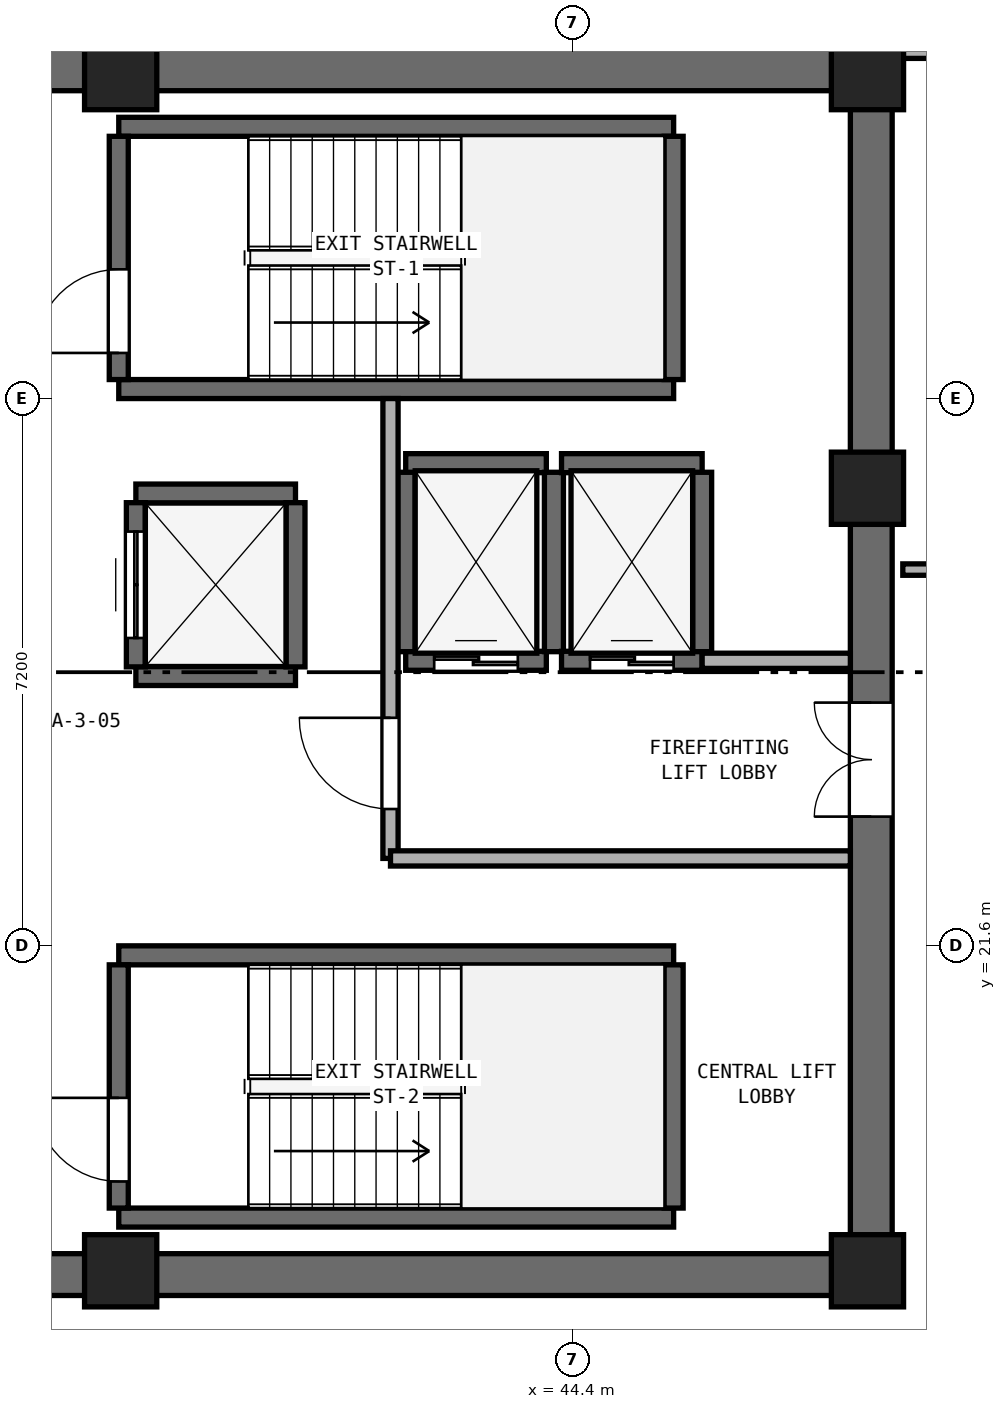
"""IFC4 building model, lengths in metres.
Left out: names, types, materials, properties, quantities, classifications, styles, units other than length and angle.
Written with IfcOpenShell. Run it as: python <this file> out.ifc"""

import sys

from ifc_helpers import new_model, si_unit, direction, frame, frame_2d, origin, origin_2d, place, context, subcontext, project, spatial, rectangle, extrude, element, fill, save


model = new_model("IFC4")
c1 = context("Model", 3, precision=1e-05, world=origin(), true_north=direction((0.0, 1.0)))
c2 = subcontext(c1, "Body", "Model", "MODEL_VIEW")
j1 = project(units=[si_unit("LENGTHUNIT", "METRE"), si_unit("PLANEANGLEUNIT", "RADIAN")], contexts=[c1])
p1 = place(None, origin())
s1 = spatial("IfcSite", under=j1, at=p1, CompositionType="ELEMENT")
p2 = place(p1, origin())
s2 = spatial("IfcBuilding", under=s1, at=p2, CompositionType="ELEMENT")
p3 = place(p2, frame((0.0, 0.0, 212.4)))
s3 = spatial("IfcBuildingStorey", under=s2, at=p3, CompositionType="ELEMENT", Elevation=212.4)
for number, where, z_axis, x_axis in (
    (1, (25.4, 17.275, 0.0), (0.0, 0.0, 1.0), (1.0, 0.0, 0.0)),
    (2, (25.4, 33.125, 0.0), (0.0, 0.0, 1.0), (1.0, 0.0, 0.0)),
):
    element("IfcWall", number, at=place(p3, frame(where, z_axis=z_axis, x_axis=x_axis)), inside=s3, PredefinedType="SHEAR", context=c2, shape_type="SweptSolid", body=[
        extrude(rectangle(XDim=23.2, YDim=0.55, at=frame_2d((11.6, 0.0))), origin(), (0.0, 0.0, 1.0), 3.54),
    ])
p4 = place(p3, frame((48.325, 17.55, 0.0), z_axis=(0.0, 0.0, 1.0), x_axis=(0.0, 1.0, 0.0)))
e3 = element("IfcWall", 3, at=p4, inside=s3, PredefinedType="SHEAR", context=c2, shape_type="SweptSolid", body=[
    extrude(rectangle(XDim=15.3, YDim=0.55, at=frame_2d((7.65, 0.0))), origin(), (0.0, 0.0, 1.0), 3.54),
])
p5 = place(p4, frame((5.75, 0.0, 0.0)))
e4 = element("IfcOpeningElement", 4, at=p5, cuts=e3, PredefinedType="OPENING", context=c2, shape_type="SweptSolid", body=[
    extrude(rectangle(XDim=1.5, YDim=2.15, at=frame_2d((0.75, 1.075))), frame((0.0, 0.285, 0.0), z_axis=(0.0, -1.0, 0.0), x_axis=(1.0, 0.0, 0.0)), (0.0, 0.0, 1.0), 0.57),
])
for number, where, z_axis, x_axis in (
    (5, (38.45, 17.325, 0.0), (0.0, 0.0, 1.0), (1.0, 0.0, 0.0)),
    (6, (48.275, 17.325, 0.0), (0.0, 0.0, 1.0), (1.0, 0.0, 0.0)),
    (7, (48.275, 27.62, 0.0), (0.0, 0.0, 1.0), (1.0, 0.0, 0.0)),
    (8, (48.275, 33.075, 0.0), (0.0, 0.0, 1.0), (1.0, 0.0, 0.0)),
    (9, (38.45, 33.075, 0.0), (0.0, 0.0, 1.0), (1.0, 0.0, 0.0)),
):
    element("IfcColumn", number, at=place(p3, frame(where, z_axis=z_axis, x_axis=x_axis)), inside=s3, PredefinedType="PILASTER", context=c2, shape_type="SweptSolid", body=[
        extrude(rectangle(XDim=0.95, YDim=0.95, at=origin_2d()), origin(), (0.0, 0.0, 1.0), 3.8),
    ])
for number, where, z_axis, x_axis in (
    (10, (38.425, 28.925, 0.0), (0.0, 0.0, 1.0), (1.0, 0.0, 0.0)),
    (11, (38.425, 32.375, 0.0), (0.0, 0.0, 1.0), (1.0, 0.0, 0.0)),
):
    element("IfcWall", number, at=place(p3, frame(where, z_axis=z_axis, x_axis=x_axis)), inside=s3, PredefinedType="SHEAR", context=c2, shape_type="SweptSolid", body=[
        extrude(rectangle(XDim=7.3, YDim=0.25, at=frame_2d((3.65, 0.0))), origin(), (0.0, 0.0, 1.0), 3.54),
    ])
p6 = place(p3, frame((38.425, 29.05, 0.0), z_axis=(0.0, 0.0, 1.0), x_axis=(0.0, 1.0, 0.0)))
e12 = element("IfcWall", 12, at=p6, inside=s3, PredefinedType="SHEAR", context=c2, shape_type="SweptSolid", body=[
    extrude(rectangle(XDim=3.2, YDim=0.25, at=frame_2d((1.6, 0.0))), origin(), (0.0, 0.0, 1.0), 3.54),
])
p7 = place(p6, frame((0.35, 0.0, 0.0)))
e13 = element("IfcOpeningElement", 13, at=p7, cuts=e12, PredefinedType="OPENING", context=c2, shape_type="SweptSolid", body=[
    extrude(rectangle(XDim=1.1, YDim=2.15, at=frame_2d((0.55, 1.075))), frame((0.0, 0.135, 0.0), z_axis=(0.0, -1.0, 0.0), x_axis=(1.0, 0.0, 0.0)), (0.0, 0.0, 1.0), 0.27),
])
p8 = place(p3, frame((45.725, 29.05, 0.0), z_axis=(0.0, 0.0, 1.0), x_axis=(0.0, 1.0, 0.0)))
e14 = element("IfcWall", 14, at=p8, inside=s3, PredefinedType="SHEAR", context=c2, shape_type="SweptSolid", body=[
    extrude(rectangle(XDim=3.2, YDim=0.25, at=frame_2d((1.6, 0.0))), origin(), (0.0, 0.0, 1.0), 3.54),
])
for number, where, z_axis, x_axis in (
    (15, (38.425, 18.025, 0.0), (0.0, 0.0, 1.0), (1.0, 0.0, 0.0)),
    (16, (38.425, 21.475, 0.0), (0.0, 0.0, 1.0), (1.0, 0.0, 0.0)),
):
    element("IfcWall", number, at=place(p3, frame(where, z_axis=z_axis, x_axis=x_axis)), inside=s3, PredefinedType="SHEAR", context=c2, shape_type="SweptSolid", body=[
        extrude(rectangle(XDim=7.3, YDim=0.25, at=frame_2d((3.65, 0.0))), origin(), (0.0, 0.0, 1.0), 3.54),
    ])
p9 = place(p3, frame((38.425, 18.15, 0.0), z_axis=(0.0, 0.0, 1.0), x_axis=(0.0, 1.0, 0.0)))
e17 = element("IfcWall", 17, at=p9, inside=s3, PredefinedType="SHEAR", context=c2, shape_type="SweptSolid", body=[
    extrude(rectangle(XDim=3.2, YDim=0.25, at=frame_2d((1.6, 0.0))), origin(), (0.0, 0.0, 1.0), 3.54),
])
p10 = place(p9, frame((0.35, 0.0, 0.0)))
e18 = element("IfcOpeningElement", 18, at=p10, cuts=e17, PredefinedType="OPENING", context=c2, shape_type="SweptSolid", body=[
    extrude(rectangle(XDim=1.1, YDim=2.15, at=frame_2d((0.55, 1.075))), frame((0.0, 0.135, 0.0), z_axis=(0.0, -1.0, 0.0), x_axis=(1.0, 0.0, 0.0)), (0.0, 0.0, 1.0), 0.27),
])
p11 = place(p3, frame((45.725, 18.15, 0.0), z_axis=(0.0, 0.0, 1.0), x_axis=(0.0, 1.0, 0.0)))
e19 = element("IfcWall", 19, at=p11, inside=s3, PredefinedType="SHEAR", context=c2, shape_type="SweptSolid", body=[
    extrude(rectangle(XDim=3.2, YDim=0.25, at=frame_2d((1.6, 0.0))), origin(), (0.0, 0.0, 1.0), 3.54),
])
p12 = place(p3, frame((42.2, 25.35, 0.0), z_axis=(0.0, 0.0, 1.0), x_axis=(1.0, 0.0, 0.0)))
e20 = element("IfcWall", 20, at=p12, inside=s3, PredefinedType="SHEAR", context=c2, shape_type="SweptSolid", body=[
    extrude(rectangle(XDim=1.85, YDim=0.25, at=frame_2d((0.925, 0.0))), origin(), (0.0, 0.0, 1.0), 3.54),
])
p13 = place(p12, frame((0.375, 0.0, 0.0)))
e21 = element("IfcOpeningElement", 21, at=p13, cuts=e20, PredefinedType="OPENING", context=c2, shape_type="SweptSolid", body=[
    extrude(rectangle(XDim=1.1, YDim=2.15, at=frame_2d((0.55, 1.075))), frame((0.0, 0.135, 0.0), z_axis=(0.0, -1.0, 0.0), x_axis=(1.0, 0.0, 0.0)), (0.0, 0.0, 1.0), 0.27),
])
p14 = place(p3, frame((42.2, 27.95, 0.0), z_axis=(0.0, 0.0, 1.0), x_axis=(1.0, 0.0, 0.0)))
e22 = element("IfcWall", 22, at=p14, inside=s3, PredefinedType="SHEAR", context=c2, shape_type="SweptSolid", body=[
    extrude(rectangle(XDim=1.85, YDim=0.25, at=frame_2d((0.925, 0.0))), origin(), (0.0, 0.0, 1.0), 3.54),
])
for number, where, z_axis, x_axis in (
    (23, (42.2, 25.47, 0.0), (0.0, 0.0, 1.0), (0.0, 1.0, 0.0)),
    (24, (44.15, 25.47, 0.0), (0.0, 0.0, 1.0), (0.0, 1.0, 0.0)),
):
    element("IfcWall", number, at=place(p3, frame(where, z_axis=z_axis, x_axis=x_axis)), inside=s3, PredefinedType="SHEAR", context=c2, shape_type="SweptSolid", body=[
        extrude(rectangle(XDim=2.36, YDim=0.25, at=frame_2d((1.18, 0.0))), origin(), (0.0, 0.0, 1.0), 3.54),
    ])
p15 = place(p3, frame((44.25, 25.35, 0.0), z_axis=(0.0, 0.0, 1.0), x_axis=(1.0, 0.0, 0.0)))
e25 = element("IfcWall", 25, at=p15, inside=s3, PredefinedType="SHEAR", context=c2, shape_type="SweptSolid", body=[
    extrude(rectangle(XDim=1.85, YDim=0.25, at=frame_2d((0.925, 0.0))), origin(), (0.0, 0.0, 1.0), 3.54),
])
p16 = place(p15, frame((0.375, 0.0, 0.0)))
e26 = element("IfcOpeningElement", 26, at=p16, cuts=e25, PredefinedType="OPENING", context=c2, shape_type="SweptSolid", body=[
    extrude(rectangle(XDim=1.1, YDim=2.15, at=frame_2d((0.55, 1.075))), frame((0.0, 0.135, 0.0), z_axis=(0.0, -1.0, 0.0), x_axis=(1.0, 0.0, 0.0)), (0.0, 0.0, 1.0), 0.27),
])
p17 = place(p3, frame((44.25, 27.95, 0.0), z_axis=(0.0, 0.0, 1.0), x_axis=(1.0, 0.0, 0.0)))
e27 = element("IfcWall", 27, at=p17, inside=s3, PredefinedType="SHEAR", context=c2, shape_type="SweptSolid", body=[
    extrude(rectangle(XDim=1.85, YDim=0.25, at=frame_2d((0.925, 0.0))), origin(), (0.0, 0.0, 1.0), 3.54),
])
p18 = place(p3, frame((46.1, 25.47, 0.0), z_axis=(0.0, 0.0, 1.0), x_axis=(0.0, 1.0, 0.0)))
e28 = element("IfcWall", 28, at=p18, inside=s3, PredefinedType="SHEAR", context=c2, shape_type="SweptSolid", body=[
    extrude(rectangle(XDim=2.36, YDim=0.25, at=frame_2d((1.18, 0.0))), origin(), (0.0, 0.0, 1.0), 3.54),
])
for number, where, z_axis, x_axis in (
    (29, (38.65, 25.15, 0.0), (0.0, 0.0, 1.0), (1.0, 0.0, 0.0)),
    (30, (38.65, 27.55, 0.0), (0.0, 0.0, 1.0), (1.0, 0.0, 0.0)),
):
    element("IfcWall", number, at=place(p3, frame(where, z_axis=z_axis, x_axis=x_axis)), inside=s3, PredefinedType="SHEAR", context=c2, shape_type="SweptSolid", body=[
        extrude(rectangle(XDim=2.1, YDim=0.25, at=frame_2d((1.05, 0.0))), origin(), (0.0, 0.0, 1.0), 3.54),
    ])
p19 = place(p3, frame((38.65, 25.27, 0.0), z_axis=(0.0, 0.0, 1.0), x_axis=(0.0, 1.0, 0.0)))
e31 = element("IfcWall", 31, at=p19, inside=s3, PredefinedType="SHEAR", context=c2, shape_type="SweptSolid", body=[
    extrude(rectangle(XDim=2.16, YDim=0.25, at=frame_2d((1.08, 0.0))), origin(), (0.0, 0.0, 1.0), 3.54),
])
p20 = place(p19, frame((0.38, 0.0, 0.0)))
e32 = element("IfcOpeningElement", 32, at=p20, cuts=e31, PredefinedType="OPENING", context=c2, shape_type="SweptSolid", body=[
    extrude(rectangle(XDim=1.4, YDim=2.2, at=frame_2d((0.7, 1.1))), frame((0.0, 0.135, 0.0), z_axis=(0.0, -1.0, 0.0), x_axis=(1.0, 0.0, 0.0)), (0.0, 0.0, 1.0), 0.27),
])
p21 = place(p3, frame((40.75, 25.27, 0.0), z_axis=(0.0, 0.0, 1.0), x_axis=(0.0, 1.0, 0.0)))
e33 = element("IfcWall", 33, at=p21, inside=s3, PredefinedType="SHEAR", context=c2, shape_type="SweptSolid", body=[
    extrude(rectangle(XDim=2.16, YDim=0.25, at=frame_2d((1.08, 0.0))), origin(), (0.0, 0.0, 1.0), 3.54),
])
p22 = place(p3, frame((42.0, 22.75, 0.0), z_axis=(0.0, 0.0, 1.0), x_axis=(0.0, 1.0, 0.0)))
e34 = element("IfcWall", 34, at=p22, inside=s3, PredefinedType="SOLIDWALL", context=c2, shape_type="SweptSolid", body=[
    extrude(rectangle(XDim=6.05, YDim=0.2, at=frame_2d((3.025, 0.0))), origin(), (0.0, 0.0, 1.0), 3.54),
])
p23 = place(p22, frame((0.65, 0.0, 0.0)))
e35 = element("IfcOpeningElement", 35, at=p23, cuts=e34, PredefinedType="OPENING", context=c2, shape_type="SweptSolid", body=[
    extrude(rectangle(XDim=1.2, YDim=2.15, at=frame_2d((0.6, 1.075))), frame((0.0, 0.11, 0.0), z_axis=(0.0, -1.0, 0.0), x_axis=(1.0, 0.0, 0.0)), (0.0, 0.0, 1.0), 0.22),
])
p24 = place(p3, frame((42.0, 22.75, 0.0), z_axis=(0.0, 0.0, 1.0), x_axis=(1.0, 0.0, 0.0)))
e36 = element("IfcWall", 36, at=p24, inside=s3, PredefinedType="SOLIDWALL", context=c2, shape_type="SweptSolid", body=[
    extrude(rectangle(XDim=6.05, YDim=0.2, at=frame_2d((3.025, 0.0))), origin(), (0.0, 0.0, 1.0), 3.54),
])
p25 = place(p3, frame((46.1, 25.35, 0.0), z_axis=(0.0, 0.0, 1.0), x_axis=(1.0, 0.0, 0.0)))
e37 = element("IfcWall", 37, at=p25, inside=s3, PredefinedType="SOLIDWALL", context=c2, shape_type="SweptSolid", body=[
    extrude(rectangle(XDim=1.95, YDim=0.2, at=frame_2d((0.975, 0.0))), origin(), (0.0, 0.0, 1.0), 3.54),
])
p26 = place(p3, frame((48.74, 26.55, 0.0), z_axis=(0.0, 0.0, 1.0), x_axis=(1.0, 0.0, 0.0)))
e38 = element("IfcWall", 38, at=p26, inside=s3, PredefinedType="PARTITIONING", context=c2, shape_type="SweptSolid", body=[
    extrude(rectangle(XDim=14.855, YDim=0.15, at=frame_2d((7.427, 0.0))), origin(), (0.0, 0.0, 1.0), 3.54),
])
p27 = place(p26, frame((6.927, 0.0, 0.0)))
e39 = element("IfcOpeningElement", 39, at=p27, cuts=e38, PredefinedType="OPENING", context=c2, shape_type="SweptSolid", body=[
    extrude(rectangle(XDim=1.0, YDim=2.12, at=frame_2d((0.5, 1.06))), frame((0.0, 0.085, 0.0), z_axis=(0.0, -1.0, 0.0), x_axis=(1.0, 0.0, 0.0)), (0.0, 0.0, 1.0), 0.17),
])
p28 = place(p3, frame((48.74, 33.35, 0.0), z_axis=(0.0, 0.0, 1.0), x_axis=(1.0, 0.0, 0.0)))
e40 = element("IfcWall", 40, at=p28, inside=s3, PredefinedType="PARTITIONING", context=c2, shape_type="SweptSolid", body=[
    extrude(rectangle(XDim=2.759, YDim=0.15, at=frame_2d((1.379, 0.0))), origin(), (0.0, 0.0, 1.0), 2.923),
])
p29 = place(p7, origin())
e41 = element("IfcDoor", 41, at=p29, inside=s3, OperationType="SINGLE_SWING_LEFT", PredefinedType="DOOR", context=c2, shape_type="SweptSolid", body=[
    extrude(rectangle(XDim=1.1, YDim=2.15, at=frame_2d((0.55, 1.075))), frame((0.0, 0.025, 0.0), z_axis=(0.0, -1.0, 0.0), x_axis=(1.0, 0.0, 0.0)), (0.0, 0.0, 1.0), 0.05),
])
fill(e13, e41)
p30 = place(p10, origin())
e42 = element("IfcDoor", 42, at=p30, inside=s3, OperationType="SINGLE_SWING_RIGHT", PredefinedType="DOOR", context=c2, shape_type="SweptSolid", body=[
    extrude(rectangle(XDim=1.1, YDim=2.15, at=frame_2d((0.55, 1.075))), frame((0.0, 0.025, 0.0), z_axis=(0.0, -1.0, 0.0), x_axis=(1.0, 0.0, 0.0)), (0.0, 0.0, 1.0), 0.05),
])
fill(e18, e42)
p31 = place(p13, origin())
e43 = element("IfcDoor", 43, at=p31, inside=s3, OperationType="DOUBLE_DOOR_SLIDING", PredefinedType="DOOR", context=c2, shape_type="SweptSolid", body=[
    extrude(rectangle(XDim=1.1, YDim=2.15, at=frame_2d((0.55, 1.075))), frame((0.0, 0.025, 0.0), z_axis=(0.0, -1.0, 0.0), x_axis=(1.0, 0.0, 0.0)), (0.0, 0.0, 1.0), 0.05),
])
fill(e21, e43)
p32 = place(p16, origin())
e44 = element("IfcDoor", 44, at=p32, inside=s3, OperationType="DOUBLE_DOOR_SLIDING", PredefinedType="DOOR", context=c2, shape_type="SweptSolid", body=[
    extrude(rectangle(XDim=1.1, YDim=2.15, at=frame_2d((0.55, 1.075))), frame((0.0, 0.025, 0.0), z_axis=(0.0, -1.0, 0.0), x_axis=(1.0, 0.0, 0.0)), (0.0, 0.0, 1.0), 0.05),
])
fill(e26, e44)
p33 = place(p20, origin())
e45 = element("IfcDoor", 45, at=p33, inside=s3, OperationType="DOUBLE_DOOR_SLIDING", PredefinedType="DOOR", context=c2, shape_type="SweptSolid", body=[
    extrude(rectangle(XDim=1.4, YDim=2.2, at=frame_2d((0.7, 1.1))), frame((0.0, 0.025, 0.0), z_axis=(0.0, -1.0, 0.0), x_axis=(1.0, 0.0, 0.0)), (0.0, 0.0, 1.0), 0.05),
])
fill(e32, e45)
p34 = place(p23, origin())
e46 = element("IfcDoor", 46, at=p34, inside=s3, OperationType="SINGLE_SWING_RIGHT", PredefinedType="DOOR", context=c2, shape_type="SweptSolid", body=[
    extrude(rectangle(XDim=1.2, YDim=2.15, at=frame_2d((0.6, 1.075))), frame((0.0, 0.025, 0.0), z_axis=(0.0, -1.0, 0.0), x_axis=(1.0, 0.0, 0.0)), (0.0, 0.0, 1.0), 0.05),
])
fill(e35, e46)
p35 = place(p5, origin())
e47 = element("IfcDoor", 47, at=p35, inside=s3, OperationType="DOUBLE_DOOR_SINGLE_SWING", PredefinedType="DOOR", context=c2, shape_type="SweptSolid", body=[
    extrude(rectangle(XDim=1.5, YDim=2.15, at=frame_2d((0.75, 1.075))), frame((0.0, 0.025, 0.0), z_axis=(0.0, -1.0, 0.0), x_axis=(1.0, 0.0, 0.0)), (0.0, 0.0, 1.0), 0.05),
])
fill(e4, e47)
save(model, sys.argv[1])
